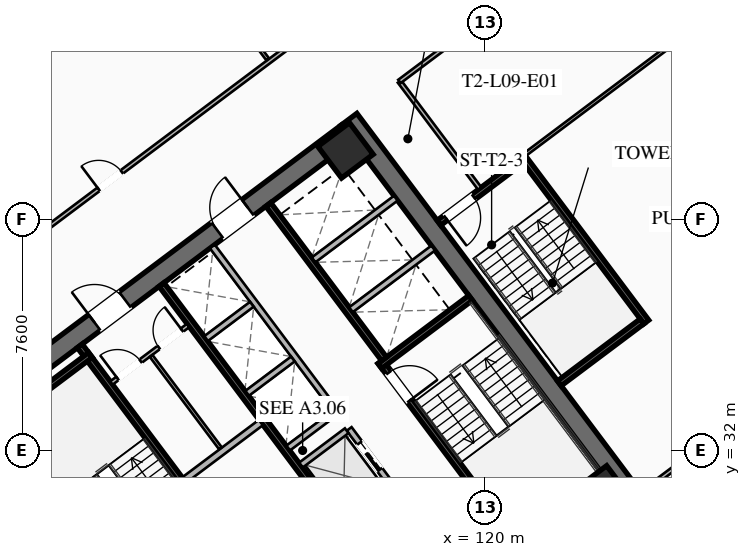
"""IFC4 building model, lengths in metres.
Left out: names, types, materials, properties, quantities, classifications, styles, units other than length and angle.
Written with IfcOpenShell. Run it as: python <this file> out.ifc"""

import sys

from ifc_helpers import new_model, si_unit, direction, frame, frame_2d, origin, origin_2d, place, context, subcontext, project, spatial, rectangle, hollow_rectangle, extrude, element, fill, save


model = new_model("IFC4")
c1 = context("Model", 3, precision=1e-05, world=origin(), true_north=direction((0.0, 1.0)))
c2 = subcontext(c1, "Body", "Model", "MODEL_VIEW")
j1 = project(units=[si_unit("LENGTHUNIT", "METRE"), si_unit("PLANEANGLEUNIT", "RADIAN")], contexts=[c1])
p1 = place(None, origin())
s1 = spatial("IfcSite", under=j1, at=p1, CompositionType="ELEMENT")
p2 = place(p1, origin())
s2 = spatial("IfcBuilding", under=s1, at=p2, CompositionType="ELEMENT")
p3 = place(p2, frame((0.0, 0.0, 38.8)))
s3 = spatial("IfcBuildingStorey", under=s2, at=p3, CompositionType="ELEMENT", Elevation=38.8)
for number, where, z_axis, x_axis in (
    (1, (112.476, 21.107, 0.0), (0.0, 0.0, 1.0), (-0.6, 0.8, 0.0)),
    (2, (115.524, 42.893, 0.0), (0.0, 0.0, 1.0), (0.6, -0.8, 0.0)),
):
    element("IfcWall", number, at=place(p3, frame(where, z_axis=z_axis, x_axis=x_axis)), inside=s3, PredefinedType="SHEAR", context=c2, shape_type="SweptSolid", body=[
        extrude(rectangle(XDim=15.6, YDim=0.65, at=frame_2d((7.8, 0.0))), origin(), (0.0, 0.0, 1.0), 3.55),
    ])
p4 = place(p3, frame((103.571, 33.522, 0.0), z_axis=(0.0, 0.0, 1.0), x_axis=(0.799998028465, 0.600002628705, 0.0)))
e3 = element("IfcWall", 3, at=p4, inside=s3, PredefinedType="SHEAR", context=c2, shape_type="SweptSolid", body=[
    extrude(rectangle(XDim=14.86, YDim=0.65, at=frame_2d((7.43, 0.0))), origin(), (0.0, 0.0, 1.0), 3.55),
])
p5 = place(p4, frame((4.48, 0.0, 0.0)))
e4 = element("IfcOpeningElement", 4, at=p5, cuts=e3, PredefinedType="OPENING", context=c2, shape_type="SweptSolid", body=[
    extrude(rectangle(XDim=1.25, YDim=2.25, at=frame_2d((0.625, 1.125))), frame((0.0, 0.335, 0.0), z_axis=(0.0, -1.0, 0.0), x_axis=(1.0, 0.0, 0.0)), (0.0, 0.0, 1.0), 0.67),
])
p6 = place(p4, frame((9.53, 0.0, 0.0)))
e5 = element("IfcOpeningElement", 5, at=p6, cuts=e3, PredefinedType="OPENING", context=c2, shape_type="SweptSolid", body=[
    extrude(rectangle(XDim=1.25, YDim=2.25, at=frame_2d((0.625, 1.125))), frame((0.0, 0.335, 0.0), z_axis=(0.0, -1.0, 0.0), x_axis=(1.0, 0.0, 0.0)), (0.0, 0.0, 1.0), 0.67),
])
for number, where, z_axis, x_axis in (
    (6, (123.87, 30.59, 0.0), (0.0, 0.0, 1.0), (0.8, 0.6, 0.0)),
    (7, (115.41, 41.87, 0.0), (0.0, 0.0, 1.0), (0.8, 0.6, 0.0)),
):
    element("IfcColumn", number, at=place(p3, frame(where, z_axis=z_axis, x_axis=x_axis)), inside=s3, PredefinedType="COLUMN", context=c2, shape_type="SweptSolid", body=[
        extrude(hollow_rectangle(XDim=1.3, YDim=1.3, WallThickness=0.05, at=origin_2d()), origin(), (0.0, 0.0, 1.0), 3.35),
    ])
p7 = place(p3, frame((111.44, 29.08, 0.0), z_axis=(0.0, 0.0, 1.0), x_axis=(-0.600009827119, 0.799992629566, 0.0)))
e8 = element("IfcWall", 8, at=p7, inside=s3, PredefinedType="SHEAR", context=c2, shape_type="SweptSolid", body=[
    extrude(rectangle(XDim=7.95, YDim=0.2, at=frame_2d((3.975, 0.0))), origin(), (0.0, 0.0, 1.0), 3.35),
])
p8 = place(p7, frame((0.45, 0.0, 0.0)))
e9 = element("IfcOpeningElement", 9, at=p8, cuts=e8, PredefinedType="OPENING", context=c2, shape_type="SweptSolid", body=[
    extrude(rectangle(XDim=1.15, YDim=2.2, at=frame_2d((0.575, 1.1))), frame((0.0, 0.11, 0.0), z_axis=(0.0, -1.0, 0.0), x_axis=(1.0, 0.0, 0.0)), (0.0, 0.0, 1.0), 0.22),
])
p9 = place(p3, frame((104.036, 32.902, 0.0), z_axis=(0.0, 0.0, 1.0), x_axis=(0.800039270442, 0.59994763584, 0.0)))
e10 = element("IfcWall", 10, at=p9, inside=s3, PredefinedType="SHEAR", context=c2, shape_type="SweptSolid", body=[
    extrude(rectangle(XDim=3.73, YDim=0.2, at=frame_2d((1.865, 0.0))), origin(), (0.0, 0.0, 1.0), 3.35),
])
p10 = place(p3, frame((116.56, 34.92, 0.0), z_axis=(0.0, 0.0, 1.0), x_axis=(0.600009827119, -0.799992629566, 0.0)))
e11 = element("IfcWall", 11, at=p10, inside=s3, PredefinedType="SHEAR", context=c2, shape_type="SweptSolid", body=[
    extrude(rectangle(XDim=7.95, YDim=0.2, at=frame_2d((3.975, 0.0))), origin(), (0.0, 0.0, 1.0), 3.35),
])
p11 = place(p10, frame((0.45, 0.0, 0.0)))
e12 = element("IfcOpeningElement", 12, at=p11, cuts=e11, PredefinedType="OPENING", context=c2, shape_type="SweptSolid", body=[
    extrude(rectangle(XDim=1.15, YDim=2.2, at=frame_2d((0.575, 1.1))), frame((0.0, 0.11, 0.0), z_axis=(0.0, -1.0, 0.0), x_axis=(1.0, 0.0, 0.0)), (0.0, 0.0, 1.0), 0.22),
])
for number, where, z_axis, x_axis in (
    (13, (116.54, 34.78, 0.0), (0.0, 0.0, 1.0), (0.8, 0.6, 0.0)),
    (14, (120.98, 28.86, 0.0), (0.0, 0.0, 1.0), (0.8, 0.6, 0.0)),
):
    element("IfcWall", number, at=place(p3, frame(where, z_axis=z_axis, x_axis=x_axis)), inside=s3, PredefinedType="SHEAR", context=c2, shape_type="SweptSolid", body=[
        extrude(rectangle(XDim=3.73, YDim=0.2, at=frame_2d((1.865, 0.0))), origin(), (0.0, 0.0, 1.0), 3.35),
    ])
p12 = place(p3, frame((117.938, 26.016, 0.0), z_axis=(0.0, 0.0, 1.0), x_axis=(-0.600005463273, 0.799995902516, 0.0)))
e15 = element("IfcWall", 15, at=p12, inside=s3, PredefinedType="SHEAR", context=c2, shape_type="SweptSolid", body=[
    extrude(rectangle(XDim=14.3, YDim=0.2, at=frame_2d((7.15, 0.0))), origin(), (0.0, 0.0, 1.0), 3.35),
])
p13 = place(p3, frame((110.104, 31.028, 0.0), z_axis=(0.0, 0.0, 1.0), x_axis=(0.800018601094, 0.59997519774, 0.0)))
e16 = element("IfcWall", 16, at=p13, inside=s3, PredefinedType="SOLIDWALL", context=c2, shape_type="SweptSolid", body=[
    extrude(rectangle(XDim=3.15, YDim=0.22, at=frame_2d((1.575, 0.0))), origin(), (0.0, 0.0, 1.0), 2.703),
])
p14 = place(p3, frame((112.87, 40.09, 0.0), z_axis=(0.0, 0.0, 1.0), x_axis=(0.599975393228, -0.800018454488, 0.0)))
e17 = element("IfcWall", 17, at=p14, inside=s3, PredefinedType="SHEAR", context=c2, shape_type="SweptSolid", body=[
    extrude(rectangle(XDim=6.35, YDim=0.2, at=frame_2d((3.175, 0.0))), origin(), (0.0, 0.0, 1.0), 3.35),
])
for number, where, z_axis, x_axis in (
    (18, (115.59, 36.63, 0.0), (0.0, 0.0, 1.0), (0.8, 0.6, 0.0)),
    (19, (114.36, 38.27, 0.0), (0.0, 0.0, 1.0), (0.8, 0.6, 0.0)),
):
    element("IfcWall", number, at=place(p3, frame(where, z_axis=z_axis, x_axis=x_axis)), inside=s3, PredefinedType="SOLIDWALL", context=c2, shape_type="SweptSolid", body=[
        extrude(rectangle(XDim=3.38, YDim=0.2, at=frame_2d((1.69, 0.0))), origin(), (0.0, 0.0, 1.0), 3.35),
    ])
p15 = place(p3, frame((107.71, 34.22, 0.0), z_axis=(0.0, 0.0, 1.0), x_axis=(0.799981399002, 0.60002480053, 0.0)))
e20 = element("IfcWall", 20, at=p15, inside=s3, PredefinedType="PARTITIONING", context=c2, shape_type="SweptSolid", body=[
    extrude(rectangle(XDim=3.15, YDim=0.135, at=frame_2d((1.575, 0.0))), origin(), (0.0, 0.0, 1.0), 2.703),
])
p16 = place(p15, frame((0.25, 0.0, 0.0)))
e21 = element("IfcOpeningElement", 21, at=p16, cuts=e20, PredefinedType="OPENING", context=c2, shape_type="SweptSolid", body=[
    extrude(rectangle(XDim=0.95, YDim=2.05, at=frame_2d((0.475, 1.025))), frame((0.0, 0.077, 0.0), z_axis=(0.0, -1.0, 0.0), x_axis=(1.0, 0.0, 0.0)), (0.0, 0.0, 1.0), 0.155),
])
p17 = place(p15, frame((1.95, 0.0, 0.0)))
e22 = element("IfcOpeningElement", 22, at=p17, cuts=e20, PredefinedType="OPENING", context=c2, shape_type="SweptSolid", body=[
    extrude(rectangle(XDim=0.95, YDim=2.05, at=frame_2d((0.475, 1.025))), frame((0.0, 0.077, 0.0), z_axis=(0.0, -1.0, 0.0), x_axis=(1.0, 0.0, 0.0)), (0.0, 0.0, 1.0), 0.155),
])
p18 = place(p3, frame((111.296, 32.072, 0.0), z_axis=(0.0, 0.0, 1.0), x_axis=(-0.59995887973, 0.800030838552, 0.0)))
e23 = element("IfcWall", 23, at=p18, inside=s3, PredefinedType="PARTITIONING", context=c2, shape_type="SweptSolid", body=[
    extrude(rectangle(XDim=3.8, YDim=0.11, at=frame_2d((1.9, 0.0))), origin(), (0.0, 0.0, 1.0), 2.703),
])
p19 = place(p3, frame((119.61, 27.27, 0.0), z_axis=(0.0, 0.0, 1.0), x_axis=(-0.600011488909, 0.79999138319, 0.0)))
e24 = element("IfcWall", 24, at=p19, inside=s3, PredefinedType="SOLIDWALL", context=c2, shape_type="SweptSolid", body=[
    extrude(rectangle(XDim=6.8, YDim=0.2, at=frame_2d((3.4, 0.0))), origin(), (0.0, 0.0, 1.0), 3.35),
])
p20 = place(p19, frame((0.625, 0.0, 0.0)))
e25 = element("IfcOpeningElement", 25, at=p20, cuts=e24, PredefinedType="OPENING", context=c2, shape_type="SweptSolid", body=[
    extrude(rectangle(XDim=1.1, YDim=2.2, at=frame_2d((0.55, 1.1))), frame((0.0, 0.11, 0.0), z_axis=(0.0, -1.0, 0.0), x_axis=(1.0, 0.0, 0.0)), (0.0, 0.0, 1.0), 0.22),
])
p21 = place(p19, frame((2.875, 0.0, 0.0)))
e26 = element("IfcOpeningElement", 26, at=p21, cuts=e24, PredefinedType="OPENING", context=c2, shape_type="SweptSolid", body=[
    extrude(rectangle(XDim=1.1, YDim=2.2, at=frame_2d((0.55, 1.1))), frame((0.0, 0.11, 0.0), z_axis=(0.0, -1.0, 0.0), x_axis=(1.0, 0.0, 0.0)), (0.0, 0.0, 1.0), 0.22),
])
p22 = place(p19, frame((5.125, 0.0, 0.0)))
e27 = element("IfcOpeningElement", 27, at=p22, cuts=e24, PredefinedType="OPENING", context=c2, shape_type="SweptSolid", body=[
    extrude(rectangle(XDim=1.1, YDim=2.2, at=frame_2d((0.55, 1.1))), frame((0.0, 0.11, 0.0), z_axis=(0.0, -1.0, 0.0), x_axis=(1.0, 0.0, 0.0)), (0.0, 0.0, 1.0), 0.22),
])
p23 = place(p3, frame((113.946, 31.522, 0.0), z_axis=(0.0, 0.0, 1.0), x_axis=(0.8, 0.6, 0.0)))
e28 = element("IfcWall", 28, at=p23, inside=s3, PredefinedType="SOLIDWALL", context=c2, shape_type="SweptSolid", body=[
    extrude(rectangle(XDim=1.88, YDim=0.2, at=frame_2d((0.94, 0.0))), origin(), (0.0, 0.0, 1.0), 3.35),
])
p24 = place(p3, frame((115.11, 33.27, 0.0), z_axis=(0.0, 0.0, 1.0), x_axis=(-0.600011488909, 0.79999138319, 0.0)))
e29 = element("IfcWall", 29, at=p24, inside=s3, PredefinedType="SOLIDWALL", context=c2, shape_type="SweptSolid", body=[
    extrude(rectangle(XDim=6.8, YDim=0.2, at=frame_2d((3.4, 0.0))), origin(), (0.0, 0.0, 1.0), 3.35),
])
p25 = place(p3, frame((113.526, 32.082, 0.0), z_axis=(0.0, 0.0, 1.0), x_axis=(0.800046745961, 0.599937666993, 0.0)))
e30 = element("IfcWall", 30, at=p25, inside=s3, PredefinedType="SOLIDWALL", context=c2, shape_type="SweptSolid", body=[
    extrude(rectangle(XDim=1.88, YDim=0.2, at=frame_2d((0.94, 0.0))), origin(), (0.0, 0.0, 1.0), 3.35),
])
p26 = place(p3, frame((112.176, 33.882, 0.0), z_axis=(0.0, 0.0, 1.0), x_axis=(0.8, 0.6, 0.0)))
e31 = element("IfcWall", 31, at=p26, inside=s3, PredefinedType="SOLIDWALL", context=c2, shape_type="SweptSolid", body=[
    extrude(rectangle(XDim=1.88, YDim=0.2, at=frame_2d((0.94, 0.0))), origin(), (0.0, 0.0, 1.0), 3.35),
])
p27 = place(p3, frame((110.826, 35.682, 0.0), z_axis=(0.0, 0.0, 1.0), x_axis=(0.799984418148, 0.600020775241, 0.0)))
e32 = element("IfcWall", 32, at=p27, inside=s3, PredefinedType="SOLIDWALL", context=c2, shape_type="SweptSolid", body=[
    extrude(rectangle(XDim=1.88, YDim=0.2, at=frame_2d((0.94, 0.0))), origin(), (0.0, 0.0, 1.0), 3.35),
])
p28 = place(p3, frame((125.304, 36.228, 0.0), z_axis=(0.0, 0.0, 1.0), x_axis=(-0.59998851072, 0.800008616831, 0.0)))
e33 = element("IfcWall", 33, at=p28, inside=s3, PredefinedType="SHEAR", context=c2, shape_type="SweptSolid", body=[
    extrude(rectangle(XDim=6.8, YDim=0.2, at=frame_2d((3.4, 0.0))), origin(), (0.0, 0.0, 1.0), 3.35),
])
p29 = place(p3, frame((121.204, 41.528, 0.0), z_axis=(0.0, 0.0, 1.0), x_axis=(-0.800017232136, -0.599977023131, 0.0)))
e34 = element("IfcWall", 34, at=p29, inside=s3, PredefinedType="SHEAR", context=c2, shape_type="SweptSolid", body=[
    extrude(rectangle(XDim=3.4, YDim=0.2, at=frame_2d((1.7, 0.0))), origin(), (0.0, 0.0, 1.0), 3.35),
])
p30 = place(p29, frame((1.975, 0.0, 0.0)))
e35 = element("IfcOpeningElement", 35, at=p30, cuts=e34, PredefinedType="OPENING", context=c2, shape_type="SweptSolid", body=[
    extrude(rectangle(XDim=1.15, YDim=2.2, at=frame_2d((0.575, 1.1))), frame((0.0, 0.11, 0.0), z_axis=(0.0, -1.0, 0.0), x_axis=(1.0, 0.0, 0.0)), (0.0, 0.0, 1.0), 0.22),
])
p31 = place(p3, frame((122.444, 34.208, 0.0), z_axis=(0.0, 0.0, 1.0), x_axis=(0.79999138319, 0.600011488909, 0.0)))
e36 = element("IfcWall", 36, at=p31, inside=s3, PredefinedType="SHEAR", context=c2, shape_type="SweptSolid", body=[
    extrude(rectangle(XDim=3.4, YDim=0.2, at=frame_2d((1.7, 0.0))), origin(), (0.0, 0.0, 1.0), 3.35),
])
p32 = place(p3, frame((119.824, 40.618, 0.0), z_axis=(0.0, 0.0, 1.0), x_axis=(-0.599982243973, 0.800013316712, 0.0)))
e37 = element("IfcWall", 37, at=p32, inside=s3, PredefinedType="PARTITIONING", context=c2, shape_type="SweptSolid", body=[
    extrude(rectangle(XDim=4.4, YDim=0.135, at=frame_2d((2.2, 0.0))), origin(), (0.0, 0.0, 1.0), 2.703),
])
p33 = place(p3, frame((98.316, 33.862, 0.0), z_axis=(0.0, 0.0, 1.0), x_axis=(0.800001947934, 0.599997402746, 0.0)))
e38 = element("IfcWall", 38, at=p33, inside=s3, PredefinedType="PARTITIONING", context=c2, shape_type="SweptSolid", body=[
    extrude(rectangle(XDim=30.08, YDim=0.135, at=frame_2d((15.04, 0.0))), origin(), (0.0, 0.0, 1.0), 2.703),
])
p34 = place(p33, frame((0.3, 0.0, 0.0)))
e39 = element("IfcOpeningElement", 39, at=p34, cuts=e38, PredefinedType="OPENING", context=c2, shape_type="SweptSolid", body=[
    extrude(rectangle(XDim=0.95, YDim=2.05, at=frame_2d((0.475, 1.025))), frame((0.0, 0.077, 0.0), z_axis=(0.0, -1.0, 0.0), x_axis=(1.0, 0.0, 0.0)), (0.0, 0.0, 1.0), 0.155),
])
p35 = place(p33, frame((7.172, 0.0, 0.0)))
e40 = element("IfcOpeningElement", 40, at=p35, cuts=e38, PredefinedType="OPENING", context=c2, shape_type="SweptSolid", body=[
    extrude(rectangle(XDim=0.95, YDim=2.05, at=frame_2d((0.475, 1.025))), frame((0.0, 0.077, 0.0), z_axis=(0.0, -1.0, 0.0), x_axis=(1.0, 0.0, 0.0)), (0.0, 0.0, 1.0), 0.155),
])
p36 = place(p33, frame((11.218, 0.0, 0.0)))
e41 = element("IfcOpeningElement", 41, at=p36, cuts=e38, PredefinedType="OPENING", context=c2, shape_type="SweptSolid", body=[
    extrude(rectangle(XDim=0.95, YDim=2.05, at=frame_2d((0.475, 1.025))), frame((0.0, 0.077, 0.0), z_axis=(0.0, -1.0, 0.0), x_axis=(1.0, 0.0, 0.0)), (0.0, 0.0, 1.0), 0.155),
])
p37 = place(p33, frame((28.83, 0.0, 0.0)))
e42 = element("IfcOpeningElement", 42, at=p37, cuts=e38, PredefinedType="OPENING", context=c2, shape_type="SweptSolid", body=[
    extrude(rectangle(XDim=0.95, YDim=2.05, at=frame_2d((0.475, 1.025))), frame((0.0, 0.077, 0.0), z_axis=(0.0, -1.0, 0.0), x_axis=(1.0, 0.0, 0.0)), (0.0, 0.0, 1.0), 0.155),
])
p38 = place(p3, frame((112.852, 44.864, 0.0), z_axis=(0.0, 0.0, 1.0), x_axis=(-0.600007405188, 0.799994446056, 0.0)))
e43 = element("IfcWall", 43, at=p38, inside=s3, PredefinedType="PARTITIONING", context=c2, shape_type="SweptSolid", body=[
    extrude(rectangle(XDim=10.55, YDim=0.11, at=frame_2d((5.275, 0.0))), origin(), (0.0, 0.0, 1.0), 2.703),
])
p39 = place(p3, frame((135.55, 34.35, 0.0), z_axis=(0.0, 0.0, 1.0), x_axis=(-0.799998052067, -0.600002597235, 0.0)))
e44 = element("IfcWall", 44, at=p39, inside=s3, PredefinedType="PARTITIONING", context=c2, shape_type="SweptSolid", body=[
    extrude(rectangle(XDim=30.08, YDim=0.135, at=frame_2d((15.04, 0.0))), origin(), (0.0, 0.0, 1.0), 2.703),
])
p40 = place(p39, frame((28.75, 0.0, 0.0)))
e45 = element("IfcOpeningElement", 45, at=p40, cuts=e44, PredefinedType="OPENING", context=c2, shape_type="SweptSolid", body=[
    extrude(rectangle(XDim=0.95, YDim=2.05, at=frame_2d((0.475, 1.025))), frame((0.0, 0.077, 0.0), z_axis=(0.0, -1.0, 0.0), x_axis=(1.0, 0.0, 0.0)), (0.0, 0.0, 1.0), 0.155),
])
p41 = place(p39, frame((21.999, 0.0, 0.0)))
e46 = element("IfcOpeningElement", 46, at=p41, cuts=e44, PredefinedType="OPENING", context=c2, shape_type="SweptSolid", body=[
    extrude(rectangle(XDim=0.95, YDim=2.05, at=frame_2d((0.475, 1.025))), frame((0.0, 0.077, 0.0), z_axis=(0.0, -1.0, 0.0), x_axis=(1.0, 0.0, 0.0)), (0.0, 0.0, 1.0), 0.155),
])
p42 = place(p39, frame((17.939, 0.0, 0.0)))
e47 = element("IfcOpeningElement", 47, at=p42, cuts=e44, PredefinedType="OPENING", context=c2, shape_type="SweptSolid", body=[
    extrude(rectangle(XDim=0.95, YDim=2.05, at=frame_2d((0.475, 1.025))), frame((0.0, 0.077, 0.0), z_axis=(0.0, -1.0, 0.0), x_axis=(1.0, 0.0, 0.0)), (0.0, 0.0, 1.0), 0.155),
])
p43 = place(p39, frame((0.38, 0.0, 0.0)))
e48 = element("IfcOpeningElement", 48, at=p43, cuts=e44, PredefinedType="OPENING", context=c2, shape_type="SweptSolid", body=[
    extrude(rectangle(XDim=0.95, YDim=2.05, at=frame_2d((0.475, 1.025))), frame((0.0, 0.077, 0.0), z_axis=(0.0, -1.0, 0.0), x_axis=(1.0, 0.0, 0.0)), (0.0, 0.0, 1.0), 0.155),
])
p44 = place(p3, frame((126.664, 51.248, 0.0), z_axis=(0.0, 0.0, 1.0), x_axis=(-0.799995055373, -0.600006592779, 0.0)))
e49 = element("IfcWall", 49, at=p44, inside=s3, PredefinedType="PARTITIONING", context=c2, shape_type="SweptSolid", body=[
    extrude(rectangle(XDim=11.85, YDim=0.135, at=frame_2d((5.925, 0.0))), origin(), (0.0, 0.0, 1.0), 2.703),
])
p45 = place(p44, frame((5.8, 0.0, 0.0)))
e50 = element("IfcOpeningElement", 50, at=p45, cuts=e49, PredefinedType="OPENING", context=c2, shape_type="SweptSolid", body=[
    extrude(rectangle(XDim=0.95, YDim=2.05, at=frame_2d((0.475, 1.025))), frame((0.0, 0.077, 0.0), z_axis=(0.0, -1.0, 0.0), x_axis=(1.0, 0.0, 0.0)), (0.0, 0.0, 1.0), 0.155),
])
p46 = place(p3, frame((125.208, 30.656, 0.0), z_axis=(0.0, 0.0, 1.0), x_axis=(0.799995666112, 0.600005778473, 0.0)))
e51 = element("IfcWall", 51, at=p46, inside=s3, PredefinedType="PARTITIONING", context=c2, shape_type="SweptSolid", body=[
    extrude(rectangle(XDim=13.52, YDim=0.135, at=frame_2d((6.76, 0.0))), origin(), (0.0, 0.0, 1.0), 2.703),
])
p47 = place(p46, frame((2.045, 0.0, 0.0)))
e52 = element("IfcOpeningElement", 52, at=p47, cuts=e51, PredefinedType="OPENING", context=c2, shape_type="SweptSolid", body=[
    extrude(rectangle(XDim=0.95, YDim=2.05, at=frame_2d((0.475, 1.025))), frame((0.0, 0.077, 0.0), z_axis=(0.0, -1.0, 0.0), x_axis=(1.0, 0.0, 0.0)), (0.0, 0.0, 1.0), 0.155),
])
p48 = place(p3, frame((129.304, 47.728, 0.0), z_axis=(0.0, 0.0, 1.0), x_axis=(-0.8, -0.6, 0.0)))
e53 = element("IfcWall", 53, at=p48, inside=s3, PredefinedType="PARTITIONING", context=c2, shape_type="SweptSolid", body=[
    extrude(rectangle(XDim=10.0, YDim=0.11, at=frame_2d((5.0, 0.0))), origin(), (0.0, 0.0, 1.0), 2.703),
])
p49 = place(p3, frame((111.438, 16.366, 0.0), z_axis=(0.0, 0.0, 1.0), x_axis=(-0.599996414648, 0.800002689001, 0.0)))
e54 = element("IfcWall", 54, at=p49, inside=s3, PredefinedType="PARTITIONING", context=c2, shape_type="SweptSolid", body=[
    extrude(rectangle(XDim=21.79, YDim=0.135, at=frame_2d((10.895, 0.0))), origin(), (0.0, 0.0, 1.0), 2.703),
])
p50 = place(p49, frame((0.3, 0.0, 0.0)))
e55 = element("IfcOpeningElement", 55, at=p50, cuts=e54, PredefinedType="OPENING", context=c2, shape_type="SweptSolid", body=[
    extrude(rectangle(XDim=0.95, YDim=2.05, at=frame_2d((0.475, 1.025))), frame((0.0, 0.077, 0.0), z_axis=(0.0, -1.0, 0.0), x_axis=(1.0, 0.0, 0.0)), (0.0, 0.0, 1.0), 0.155),
])
p51 = place(p5, origin())
e56 = element("IfcDoor", 56, at=p51, inside=s3, OperationType="SINGLE_SWING_LEFT", PredefinedType="DOOR", context=c2, shape_type="SweptSolid", body=[
    extrude(rectangle(XDim=1.25, YDim=2.25, at=frame_2d((0.625, 1.125))), frame((0.0, 0.025, 0.0), z_axis=(0.0, -1.0, 0.0), x_axis=(1.0, 0.0, 0.0)), (0.0, 0.0, 1.0), 0.05),
])
fill(e4, e56)
p52 = place(p6, origin())
e57 = element("IfcDoor", 57, at=p52, inside=s3, OperationType="SINGLE_SWING_RIGHT", PredefinedType="DOOR", context=c2, shape_type="SweptSolid", body=[
    extrude(rectangle(XDim=1.25, YDim=2.25, at=frame_2d((0.625, 1.125))), frame((0.0, 0.025, 0.0), z_axis=(0.0, -1.0, 0.0), x_axis=(1.0, 0.0, 0.0)), (0.0, 0.0, 1.0), 0.05),
])
fill(e5, e57)
p53 = place(p11, origin())
e58 = element("IfcDoor", 58, at=p53, inside=s3, OperationType="SINGLE_SWING_RIGHT", PredefinedType="DOOR", context=c2, shape_type="SweptSolid", body=[
    extrude(rectangle(XDim=1.15, YDim=2.2, at=frame_2d((0.575, 1.1))), frame((0.0, 0.025, 0.0), z_axis=(0.0, -1.0, 0.0), x_axis=(1.0, 0.0, 0.0)), (0.0, 0.0, 1.0), 0.05),
])
fill(e12, e58)
p54 = place(p16, origin())
e59 = element("IfcDoor", 59, at=p54, inside=s3, OperationType="SINGLE_SWING_LEFT", PredefinedType="DOOR", context=c2, shape_type="SweptSolid", body=[
    extrude(rectangle(XDim=0.95, YDim=2.05, at=frame_2d((0.475, 1.025))), frame((0.0, 0.025, 0.0), z_axis=(0.0, -1.0, 0.0), x_axis=(1.0, 0.0, 0.0)), (0.0, 0.0, 1.0), 0.05),
])
fill(e21, e59)
p55 = place(p17, origin())
e60 = element("IfcDoor", 60, at=p55, inside=s3, OperationType="SINGLE_SWING_RIGHT", PredefinedType="DOOR", context=c2, shape_type="SweptSolid", body=[
    extrude(rectangle(XDim=0.95, YDim=2.05, at=frame_2d((0.475, 1.025))), frame((0.0, 0.025, 0.0), z_axis=(0.0, -1.0, 0.0), x_axis=(1.0, 0.0, 0.0)), (0.0, 0.0, 1.0), 0.05),
])
fill(e22, e60)
p56 = place(p30, origin())
e61 = element("IfcDoor", 61, at=p56, inside=s3, OperationType="SINGLE_SWING_RIGHT", PredefinedType="DOOR", context=c2, shape_type="SweptSolid", body=[
    extrude(rectangle(XDim=1.15, YDim=2.2, at=frame_2d((0.575, 1.1))), frame((0.0, 0.025, 0.0), z_axis=(0.0, -1.0, 0.0), x_axis=(1.0, 0.0, 0.0)), (0.0, 0.0, 1.0), 0.05),
])
fill(e35, e61)
p57 = place(p36, origin())
e62 = element("IfcDoor", 62, at=p57, inside=s3, OperationType="SINGLE_SWING_LEFT", PredefinedType="DOOR", context=c2, shape_type="SweptSolid", body=[
    extrude(rectangle(XDim=0.95, YDim=2.05, at=frame_2d((0.475, 1.025))), frame((0.0, 0.025, 0.0), z_axis=(0.0, -1.0, 0.0), x_axis=(1.0, 0.0, 0.0)), (0.0, 0.0, 1.0), 0.05),
])
fill(e41, e62)
p58 = place(p22, origin())
e63 = element("IfcDoor", 63, at=p58, inside=s3, OperationType="SLIDING_TO_LEFT", PredefinedType="DOOR", context=c2, shape_type="SweptSolid", body=[
    extrude(rectangle(XDim=1.1, YDim=2.2, at=frame_2d((0.55, 1.1))), frame((0.0, 0.025, 0.0), z_axis=(0.0, -1.0, 0.0), x_axis=(1.0, 0.0, 0.0)), (0.0, 0.0, 1.0), 0.05),
])
fill(e27, e63)
save(model, sys.argv[1])
